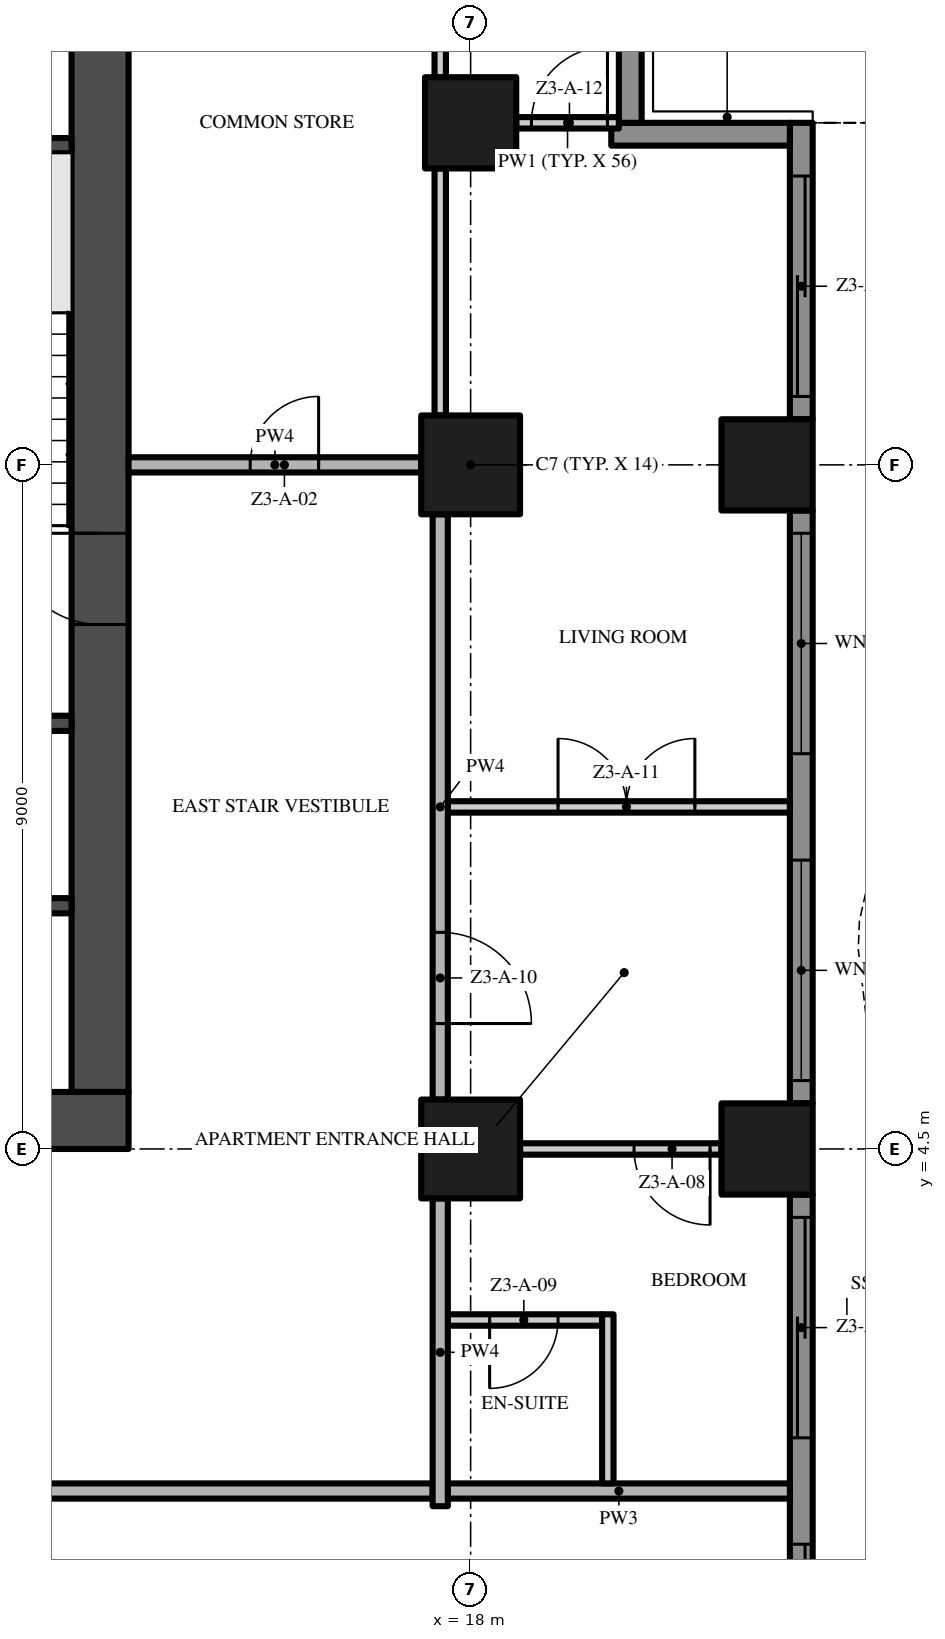
"""IFC4 building model, lengths in metres.
Left out: names, types, materials, properties, quantities, classifications, styles, units other than length and angle.
Written with IfcOpenShell. Run it as: python <this file> out.ifc"""

import sys

from ifc_helpers import new_model, si_unit, direction, frame, frame_2d, origin, origin_2d, place, context, subcontext, project, spatial, polyline, rectangle, outline, extrude, element, fill, save


model = new_model("IFC4")
c1 = context("Model", 3, precision=1e-05, world=origin(), true_north=direction((0.0, 1.0)))
c2 = subcontext(c1, "Body", "Model", "MODEL_VIEW")
j1 = project(units=[si_unit("LENGTHUNIT", "METRE"), si_unit("PLANEANGLEUNIT", "RADIAN")], contexts=[c1])
p1 = place(None, origin())
s1 = spatial("IfcSite", under=j1, at=p1, CompositionType="ELEMENT")
p2 = place(p1, origin())
s2 = spatial("IfcBuilding", under=s1, at=p2, CompositionType="ELEMENT")
p3 = place(p2, frame((0.0, 0.0, 125.0)))
s3 = spatial("IfcBuildingStorey", under=s2, at=p3, CompositionType="ELEMENT", Elevation=125.0)
p4 = place(p3, frame((-13.5, 4.875, -0.3), z_axis=(0.0, 0.0, 1.0), x_axis=(1.0, 0.0, 0.0)))
e1 = element("IfcWall", 1, at=p4, inside=s3, PredefinedType="SHEAR", context=c2, shape_type="SweptSolid", body=[
    extrude(rectangle(XDim=27.0, YDim=0.75, at=frame_2d((13.5, 0.0))), origin(), (0.0, 0.0, 1.0), 3.8),
])
p5 = place(p4, frame((12.0, 0.0, 0.3)))
e2 = element("IfcOpeningElement", 2, at=p5, cuts=e1, PredefinedType="OPENING", context=c2, shape_type="SweptSolid", body=[
    extrude(rectangle(XDim=3.0, YDim=2.4, at=frame_2d((1.5, 1.2))), frame((0.0, 0.385, 0.0), z_axis=(0.0, -1.0, 0.0), x_axis=(1.0, 0.0, 0.0)), (0.0, 0.0, 1.0), 0.77),
])
p6 = place(p4, frame((4.9, 0.0, 0.3)))
e3 = element("IfcOpeningElement", 3, at=p6, cuts=e1, PredefinedType="OPENING", context=c2, shape_type="SweptSolid", body=[
    extrude(rectangle(XDim=1.2, YDim=2.2, at=frame_2d((0.6, 1.1))), frame((0.0, 0.385, 0.0), z_axis=(0.0, -1.0, 0.0), x_axis=(1.0, 0.0, 0.0)), (0.0, 0.0, 1.0), 0.77),
])
p7 = place(p4, frame((20.75, 0.0, 0.3)))
e4 = element("IfcOpeningElement", 4, at=p7, cuts=e1, PredefinedType="OPENING", context=c2, shape_type="SweptSolid", body=[
    extrude(rectangle(XDim=1.5, YDim=2.2, at=frame_2d((0.75, 1.1))), frame((0.0, 0.385, 0.0), z_axis=(0.0, -1.0, 0.0), x_axis=(1.0, 0.0, 0.0)), (0.0, 0.0, 1.0), 0.77),
])
p8 = place(p4, frame((17.4, 0.0, 0.3)))
e5 = element("IfcOpeningElement", 5, at=p8, cuts=e1, PredefinedType="OPENING", context=c2, shape_type="SweptSolid", body=[
    extrude(rectangle(XDim=1.2, YDim=2.2, at=frame_2d((0.6, 1.1))), frame((0.0, 0.385, 0.0), z_axis=(0.0, -1.0, 0.0), x_axis=(1.0, 0.0, 0.0)), (0.0, 0.0, 1.0), 0.77),
])
p9 = place(p3, frame((13.125, 5.25, -0.3), z_axis=(0.0, 0.0, 1.0), x_axis=(0.0, 1.0, 0.0)))
e6 = element("IfcWall", 6, at=p9, inside=s3, PredefinedType="SHEAR", context=c2, shape_type="SweptSolid", body=[
    extrude(rectangle(XDim=16.5, YDim=0.75, at=frame_2d((8.25, 0.0))), origin(), (0.0, 0.0, 1.0), 3.8),
])
p10 = place(p9, frame((6.15, 0.0, 0.3)))
e7 = element("IfcOpeningElement", 7, at=p10, cuts=e6, PredefinedType="OPENING", context=c2, shape_type="SweptSolid", body=[
    extrude(rectangle(XDim=1.2, YDim=2.2, at=frame_2d((0.6, 1.1))), frame((0.0, 0.385, 0.0), z_axis=(0.0, -1.0, 0.0), x_axis=(1.0, 0.0, 0.0)), (0.0, 0.0, 1.0), 0.77),
])
for number, where, z_axis, x_axis in (
    (8, (18.0, 13.5, 0.0), (0.0, 0.0, 1.0), (1.0, 0.0, 0.0)),
    (9, (18.0, 4.5, 0.0), (0.0, 0.0, 1.0), (1.0, 0.0, 0.0)),
):
    element("IfcColumn", number, at=place(p3, frame(where, z_axis=z_axis, x_axis=x_axis)), inside=s3, PredefinedType="COLUMN", context=c2, shape_type="SweptSolid", body=[
        extrude(rectangle(XDim=1.3, YDim=1.3, at=origin_2d()), origin(), (0.0, 0.0, 1.0), 3.5),
    ])
for number, where, z_axis, x_axis in (
    (10, (21.9, 13.5, 0.0), (0.0, 0.0, 1.0), (1.0, 0.0, 0.0)),
    (11, (18.0, 18.0, 0.0), (0.0, 0.0, 1.0), (1.0, 0.0, 0.0)),
    (12, (21.9, 4.5, 0.0), (0.0, 0.0, 1.0), (1.0, 0.0, 0.0)),
):
    element("IfcColumn", number, at=place(p3, frame(where, z_axis=z_axis, x_axis=x_axis)), inside=s3, PredefinedType="COLUMN", context=c2, shape_type="SweptSolid", body=[
        extrude(rectangle(XDim=1.2, YDim=1.2, at=origin_2d()), origin(), (0.0, 0.0, 1.0), 3.5),
    ])
p11 = place(p3, frame((22.35, 3.9, 0.0), z_axis=(0.0, 0.0, 1.0), x_axis=(0.0, -1.0, 0.0)))
e13 = element("IfcWall", 13, at=p11, inside=s3, PredefinedType="SOLIDWALL", context=c2, shape_type="SweptSolid", body=[
    extrude(rectangle(XDim=7.8, YDim=0.3, at=frame_2d((3.9, 0.0))), origin(), (0.0, 0.0, 1.0), 3.5),
])
p12 = place(p11, frame((4.6, 0.0, 0.0)))
e14 = element("IfcOpeningElement", 14, at=p12, cuts=e13, PredefinedType="OPENING", context=c2, shape_type="SweptSolid", body=[
    extrude(rectangle(XDim=2.9, YDim=2.4, at=frame_2d((1.45, 1.2))), frame((0.0, 0.16, 0.0), z_axis=(0.0, -1.0, 0.0), x_axis=(1.0, 0.0, 0.0)), (0.0, 0.0, 1.0), 0.32),
])
p13 = place(p11, frame((0.3, 0.0, 0.0)))
e15 = element("IfcOpeningElement", 15, at=p13, cuts=e13, PredefinedType="OPENING", context=c2, shape_type="SweptSolid", body=[
    extrude(rectangle(XDim=2.9, YDim=2.4, at=frame_2d((1.45, 1.2))), frame((0.0, 0.16, 0.0), z_axis=(0.0, -1.0, 0.0), x_axis=(1.0, 0.0, 0.0)), (0.0, 0.0, 1.0), 0.32),
])
p14 = place(p3, frame((22.35, 12.9, 0.0), z_axis=(0.0, 0.0, 1.0), x_axis=(0.0, -1.0, 0.0)))
e16 = element("IfcWall", 16, at=p14, inside=s3, PredefinedType="SOLIDWALL", context=c2, shape_type="SweptSolid", body=[
    extrude(rectangle(XDim=7.8, YDim=0.3, at=frame_2d((3.9, 0.0))), origin(), (0.0, 0.0, 1.0), 3.5),
])
p15 = place(p14, frame((4.6, 0.0, 0.45)))
e17 = element("IfcOpeningElement", 17, at=p15, cuts=e16, PredefinedType="OPENING", context=c2, shape_type="SweptSolid", body=[
    extrude(rectangle(XDim=2.9, YDim=2.65, at=frame_2d((1.45, 1.325))), frame((0.0, 0.16, 0.0), z_axis=(0.0, -1.0, 0.0), x_axis=(1.0, 0.0, 0.0)), (0.0, 0.0, 1.0), 0.32),
])
p16 = place(p14, frame((0.3, 0.0, 0.45)))
e18 = element("IfcOpeningElement", 18, at=p16, cuts=e16, PredefinedType="OPENING", context=c2, shape_type="SweptSolid", body=[
    extrude(rectangle(XDim=2.9, YDim=2.65, at=frame_2d((1.45, 1.325))), frame((0.0, 0.16, 0.0), z_axis=(0.0, -1.0, 0.0), x_axis=(1.0, 0.0, 0.0)), (0.0, 0.0, 1.0), 0.32),
])
p17 = place(p3, frame((22.35, 18.0, 0.0), z_axis=(0.0, 0.0, 1.0), x_axis=(0.0, -1.0, 0.0)))
e19 = element("IfcWall", 19, at=p17, inside=s3, PredefinedType="SOLIDWALL", context=c2, shape_type="SweptSolid", body=[
    extrude(rectangle(XDim=3.9, YDim=0.3, at=frame_2d((1.95, 0.0))), origin(), (0.0, 0.0, 1.0), 3.5),
])
p18 = place(p17, frame((0.7, 0.0, 0.0)))
e20 = element("IfcOpeningElement", 20, at=p18, cuts=e19, PredefinedType="OPENING", context=c2, shape_type="SweptSolid", body=[
    extrude(rectangle(XDim=2.9, YDim=2.4, at=frame_2d((1.45, 1.2))), frame((0.0, 0.16, 0.0), z_axis=(0.0, -1.0, 0.0), x_axis=(1.0, 0.0, 0.0)), (0.0, 0.0, 1.0), 0.32),
])
p19 = place(p3, frame((19.85, 17.85, 0.0), z_axis=(0.0, 0.0, 1.0), x_axis=(1.0, 0.0, 0.0)))
e21 = element("IfcWall", 21, at=p19, inside=s3, PredefinedType="SOLIDWALL", context=c2, shape_type="SweptSolid", body=[
    extrude(rectangle(XDim=2.35, YDim=0.3, at=frame_2d((1.175, 0.0))), origin(), (0.0, 0.0, 1.0), 3.5),
])
p20 = place(p3, frame((20.1, 20.25, 0.0), z_axis=(0.0, 0.0, 1.0), x_axis=(0.0, -1.0, 0.0)))
e22 = element("IfcWall", 22, at=p20, inside=s3, PredefinedType="SOLIDWALL", context=c2, shape_type="SweptSolid", body=[
    extrude(rectangle(XDim=2.25, YDim=0.3, at=frame_2d((1.125, 0.0))), origin(), (0.0, 0.0, 1.0), 3.5),
])
p21 = place(p3, origin())
e23 = element("IfcWall", 23, at=p21, inside=s3, PredefinedType="USERDEFINED", context=c2, shape_type="SweptSolid", body=[
    extrude(outline(polyline([(25.149, -13.5), (24.488, -12.0), (23.755, -10.5), (23.231, -9.0), (23.1, -7.875), (23.115, -7.5), (23.451, -6.0), (24.112, -4.5), (24.845, -3.0), (25.369, -1.5), (25.5, -0.375), (25.485, 0.0), (25.149, 1.5), (24.488, 3.0), (23.755, 4.5), (23.231, 6.0), (23.1, 7.125), (23.115, 7.5), (23.451, 9.0), (24.112, 10.5), (24.845, 12.0), (25.369, 13.5), (25.5, 14.625), (25.485, 15.0), (25.149, 16.5), (24.488, 18.0), (24.259, 17.899), (24.91, 16.421), (25.236, 14.967), (25.249, 14.635), (25.124, 13.556), (24.614, 12.096), (23.885, 10.605), (23.213, 9.079), (22.866, 7.533), (22.849, 7.115), (22.986, 5.944), (23.524, 4.404), (24.261, 2.895), (24.91, 1.421), (25.236, -0.033), (25.249, -0.365), (25.124, -1.444), (24.614, -2.904), (23.885, -4.395), (23.213, -5.921), (22.866, -7.467), (22.849, -7.885), (22.986, -9.056), (23.524, -10.596), (24.261, -12.105), (24.92, -13.601), (25.149, -13.5)])), origin(), (0.0, 0.0, 1.0), 0.9),
])
for number, where, z_axis, x_axis in (
    (24, (9.65, 7.7, 0.0), (0.0, 0.0, 1.0), (1.0, 0.0, 0.0)),
    (25, (9.65, 10.1, 0.0), (0.0, 0.0, 1.0), (1.0, 0.0, 0.0)),
    (26, (9.65, 17.7, 0.0), (0.0, 0.0, 1.0), (1.0, 0.0, 0.0)),
):
    element("IfcWall", number, at=place(p3, frame(where, z_axis=z_axis, x_axis=x_axis)), inside=s3, PredefinedType="SHEAR", context=c2, shape_type="SweptSolid", body=[
        extrude(rectangle(XDim=3.1, YDim=0.2, at=frame_2d((1.55, 0.0))), origin(), (0.0, 0.0, 1.0), 3.5),
    ])
p22 = place(p3, frame((17.5, 0.0, 0.0), z_axis=(0.0, 0.0, 1.0), x_axis=(-1.0, 0.0, 0.0)))
e27 = element("IfcWall", 27, at=p22, inside=s3, PredefinedType="PARTITIONING", context=c2, shape_type="SweptSolid", body=[
    extrude(rectangle(XDim=35.0, YDim=0.2, at=frame_2d((17.5, 0.0))), origin(), (0.0, 0.0, 1.0), 3.5),
])
p23 = place(p22, frame((16.75, 0.0, 0.0)))
e28 = element("IfcOpeningElement", 28, at=p23, cuts=e27, PredefinedType="OPENING", context=c2, shape_type="SweptSolid", body=[
    extrude(rectangle(XDim=1.5, YDim=2.4, at=frame_2d((0.75, 1.2))), frame((0.0, 0.11, 0.0), z_axis=(0.0, -1.0, 0.0), x_axis=(1.0, 0.0, 0.0)), (0.0, 0.0, 1.0), 0.22),
])
p24 = place(p3, frame((17.7, 0.0, 0.0), z_axis=(0.0, 0.0, 1.0), x_axis=(1.0, 0.0, 0.0)))
e29 = element("IfcWall", 29, at=p24, inside=s3, PredefinedType="PARTITIONING", context=c2, shape_type="SweptSolid", body=[
    extrude(rectangle(XDim=4.5, YDim=0.2, at=frame_2d((2.25, 0.0))), origin(), (0.0, 0.0, 1.0), 3.5),
])
p25 = place(p3, frame((19.73, 2.25, 0.0), z_axis=(0.0, 0.0, 1.0), x_axis=(-1.0, 0.0, 0.0)))
e30 = element("IfcWall", 30, at=p25, inside=s3, PredefinedType="PARTITIONING", context=c2, shape_type="SweptSolid", body=[
    extrude(rectangle(XDim=2.03, YDim=0.15, at=frame_2d((1.015, 0.0))), origin(), (0.0, 0.0, 1.0), 3.5),
])
p26 = place(p25, frame((0.58, 0.0, 0.0)))
e31 = element("IfcOpeningElement", 31, at=p26, cuts=e30, PredefinedType="OPENING", context=c2, shape_type="SweptSolid", body=[
    extrude(rectangle(XDim=0.9, YDim=2.1, at=frame_2d((0.45, 1.05))), frame((0.0, 0.085, 0.0), z_axis=(0.0, -1.0, 0.0), x_axis=(1.0, 0.0, 0.0)), (0.0, 0.0, 1.0), 0.17),
])
p27 = place(p3, frame((21.3, 4.5, 0.0), z_axis=(0.0, 0.0, 1.0), x_axis=(-1.0, 0.0, 0.0)))
e32 = element("IfcWall", 32, at=p27, inside=s3, PredefinedType="PARTITIONING", context=c2, shape_type="SweptSolid", body=[
    extrude(rectangle(XDim=2.65, YDim=0.15, at=frame_2d((1.325, 0.0))), origin(), (0.0, 0.0, 1.0), 3.5),
])
p28 = place(p27, frame((0.15, 0.0, 0.0)))
e33 = element("IfcOpeningElement", 33, at=p28, cuts=e32, PredefinedType="OPENING", context=c2, shape_type="SweptSolid", body=[
    extrude(rectangle(XDim=1.0, YDim=2.4, at=frame_2d((0.5, 1.2))), frame((0.0, 0.085, 0.0), z_axis=(0.0, -1.0, 0.0), x_axis=(1.0, 0.0, 0.0)), (0.0, 0.0, 1.0), 0.17),
])
p29 = place(p3, frame((17.7, 9.0, 0.0), z_axis=(0.0, 0.0, 1.0), x_axis=(1.0, 0.0, 0.0)))
e34 = element("IfcWall", 34, at=p29, inside=s3, PredefinedType="PARTITIONING", context=c2, shape_type="SweptSolid", body=[
    extrude(rectangle(XDim=4.5, YDim=0.15, at=frame_2d((2.25, 0.0))), origin(), (0.0, 0.0, 1.0), 3.5),
])
p30 = place(p29, frame((1.45, 0.0, 0.0)))
e35 = element("IfcOpeningElement", 35, at=p30, cuts=e34, PredefinedType="OPENING", context=c2, shape_type="SweptSolid", body=[
    extrude(rectangle(XDim=1.8, YDim=2.4, at=frame_2d((0.9, 1.2))), frame((0.0, 0.085, 0.0), z_axis=(0.0, -1.0, 0.0), x_axis=(1.0, 0.0, 0.0)), (0.0, 0.0, 1.0), 0.17),
])
p31 = place(p3, frame((13.5, 13.5, 0.0), z_axis=(0.0, 0.0, 1.0), x_axis=(1.0, 0.0, 0.0)))
e36 = element("IfcWall", 36, at=p31, inside=s3, PredefinedType="PARTITIONING", context=c2, shape_type="SweptSolid", body=[
    extrude(rectangle(XDim=3.85, YDim=0.2, at=frame_2d((1.925, 0.0))), origin(), (0.0, 0.0, 1.0), 3.5),
])
p32 = place(p31, frame((1.6, 0.0, 0.0)))
e37 = element("IfcOpeningElement", 37, at=p32, cuts=e36, PredefinedType="OPENING", context=c2, shape_type="SweptSolid", body=[
    extrude(rectangle(XDim=0.9, YDim=2.1, at=frame_2d((0.45, 1.05))), frame((0.0, 0.11, 0.0), z_axis=(0.0, -1.0, 0.0), x_axis=(1.0, 0.0, 0.0)), (0.0, 0.0, 1.0), 0.22),
])
p33 = place(p3, frame((18.6, 18.0, 0.0), z_axis=(0.0, 0.0, 1.0), x_axis=(1.0, 0.0, 0.0)))
e38 = element("IfcWall", 38, at=p33, inside=s3, PredefinedType="PARTITIONING", context=c2, shape_type="SweptSolid", body=[
    extrude(rectangle(XDim=1.35, YDim=0.15, at=frame_2d((0.675, 0.0))), origin(), (0.0, 0.0, 1.0), 3.5),
])
p34 = place(p33, frame((0.2, 0.0, 0.0)))
e39 = element("IfcOpeningElement", 39, at=p34, cuts=e38, PredefinedType="OPENING", context=c2, shape_type="SweptSolid", body=[
    extrude(rectangle(XDim=1.0, YDim=2.4, at=frame_2d((0.5, 1.2))), frame((0.0, 0.085, 0.0), z_axis=(0.0, -1.0, 0.0), x_axis=(1.0, 0.0, 0.0)), (0.0, 0.0, 1.0), 0.17),
])
p35 = place(p3, frame((17.6, -0.2, 0.0), z_axis=(0.0, 0.0, 1.0), x_axis=(0.0, 1.0, 0.0)))
e40 = element("IfcWall", 40, at=p35, inside=s3, PredefinedType="PARTITIONING", context=c2, shape_type="SweptSolid", body=[
    extrude(rectangle(XDim=4.05, YDim=0.2, at=frame_2d((2.025, 0.0))), origin(), (0.0, 0.0, 1.0), 3.5),
])
p36 = place(p3, frame((17.6, 12.85, 0.0), z_axis=(0.0, 0.0, 1.0), x_axis=(0.0, -1.0, 0.0)))
e41 = element("IfcWall", 41, at=p36, inside=s3, PredefinedType="PARTITIONING", context=c2, shape_type="SweptSolid", body=[
    extrude(rectangle(XDim=7.7, YDim=0.2, at=frame_2d((3.85, 0.0))), origin(), (0.0, 0.0, 1.0), 3.5),
])
p37 = place(p36, frame((5.5, 0.0, 0.0)))
e42 = element("IfcOpeningElement", 42, at=p37, cuts=e41, PredefinedType="OPENING", context=c2, shape_type="SweptSolid", body=[
    extrude(rectangle(XDim=1.2, YDim=2.4, at=frame_2d((0.6, 1.2))), frame((0.0, 0.11, 0.0), z_axis=(0.0, -1.0, 0.0), x_axis=(1.0, 0.0, 0.0)), (0.0, 0.0, 1.0), 0.22),
])
p38 = place(p3, frame((17.6, 14.15, 0.0), z_axis=(0.0, 0.0, 1.0), x_axis=(0.0, 1.0, 0.0)))
e43 = element("IfcWall", 43, at=p38, inside=s3, PredefinedType="PARTITIONING", context=c2, shape_type="SweptSolid", body=[
    extrude(rectangle(XDim=3.25, YDim=0.15, at=frame_2d((1.625, 0.0))), origin(), (0.0, 0.0, 1.0), 3.5),
])
p39 = place(p3, frame((17.6, 18.6, 0.0), z_axis=(0.0, 0.0, 1.0), x_axis=(0.0, 1.0, 0.0)))
e44 = element("IfcWall", 44, at=p39, inside=s3, PredefinedType="PARTITIONING", context=c2, shape_type="SweptSolid", body=[
    extrude(rectangle(XDim=2.7, YDim=0.15, at=frame_2d((1.35, 0.0))), origin(), (0.0, 0.0, 1.0), 3.5),
])
p40 = place(p3, frame((19.805, 0.1, 0.0), z_axis=(0.0, 0.0, 1.0), x_axis=(0.0, 1.0, 0.0)))
e45 = element("IfcWall", 45, at=p40, inside=s3, PredefinedType="PARTITIONING", context=c2, shape_type="SweptSolid", body=[
    extrude(rectangle(XDim=2.225, YDim=0.15, at=frame_2d((1.113, 0.0))), origin(), (0.0, 0.0, 1.0), 3.5),
])
p41 = place(p12, origin())
e46 = element("IfcDoor", 46, at=p41, inside=s3, OperationType="SINGLE_SWING_LEFT", PredefinedType="DOOR", context=c2, shape_type="SweptSolid", body=[
    extrude(rectangle(XDim=2.9, YDim=2.4, at=frame_2d((1.45, 1.2))), frame((0.0, 0.025, 0.0), z_axis=(0.0, -1.0, 0.0), x_axis=(1.0, 0.0, 0.0)), (0.0, 0.0, 1.0), 0.05),
])
fill(e14, e46)
p42 = place(p13, origin())
e47 = element("IfcDoor", 47, at=p42, inside=s3, OperationType="SINGLE_SWING_LEFT", PredefinedType="DOOR", context=c2, shape_type="SweptSolid", body=[
    extrude(rectangle(XDim=2.9, YDim=2.4, at=frame_2d((1.45, 1.2))), frame((0.0, 0.025, 0.0), z_axis=(0.0, -1.0, 0.0), x_axis=(1.0, 0.0, 0.0)), (0.0, 0.0, 1.0), 0.05),
])
fill(e15, e47)
p43 = place(p15, origin())
e48 = element("IfcWindow", 48, at=p43, inside=s3, PartitioningType="SINGLE_PANEL", PredefinedType="WINDOW", context=c2, shape_type="SweptSolid", body=[
    extrude(rectangle(XDim=2.9, YDim=2.65, at=frame_2d((1.45, 1.325))), frame((0.0, 0.03, 0.0), z_axis=(0.0, -1.0, 0.0), x_axis=(1.0, 0.0, 0.0)), (0.0, 0.0, 1.0), 0.06),
])
fill(e17, e48)
p44 = place(p16, origin())
e49 = element("IfcWindow", 49, at=p44, inside=s3, PartitioningType="SINGLE_PANEL", PredefinedType="WINDOW", context=c2, shape_type="SweptSolid", body=[
    extrude(rectangle(XDim=2.9, YDim=2.65, at=frame_2d((1.45, 1.325))), frame((0.0, 0.03, 0.0), z_axis=(0.0, -1.0, 0.0), x_axis=(1.0, 0.0, 0.0)), (0.0, 0.0, 1.0), 0.06),
])
fill(e18, e49)
p45 = place(p18, origin())
e50 = element("IfcDoor", 50, at=p45, inside=s3, OperationType="SINGLE_SWING_LEFT", PredefinedType="DOOR", context=c2, shape_type="SweptSolid", body=[
    extrude(rectangle(XDim=2.9, YDim=2.4, at=frame_2d((1.45, 1.2))), frame((0.0, 0.025, 0.0), z_axis=(0.0, -1.0, 0.0), x_axis=(1.0, 0.0, 0.0)), (0.0, 0.0, 1.0), 0.05),
])
fill(e20, e50)
p46 = place(p10, frame((1.2, 0.0, 0.0), z_axis=(0.0, 0.0, 1.0), x_axis=(-1.0, 0.0, 0.0)))
e51 = element("IfcDoor", 51, at=p46, inside=s3, OperationType="SINGLE_SWING_LEFT", PredefinedType="DOOR", context=c2, shape_type="SweptSolid", body=[
    extrude(rectangle(XDim=1.2, YDim=2.2, at=frame_2d((0.6, 1.1))), frame((0.0, 0.025, 0.0), z_axis=(0.0, -1.0, 0.0), x_axis=(1.0, 0.0, 0.0)), (0.0, 0.0, 1.0), 0.05),
])
fill(e7, e51)
p47 = place(p32, origin())
e52 = element("IfcDoor", 52, at=p47, inside=s3, OperationType="SINGLE_SWING_RIGHT", PredefinedType="DOOR", context=c2, shape_type="SweptSolid", body=[
    extrude(rectangle(XDim=0.9, YDim=2.1, at=frame_2d((0.45, 1.05))), frame((0.0, 0.025, 0.0), z_axis=(0.0, -1.0, 0.0), x_axis=(1.0, 0.0, 0.0)), (0.0, 0.0, 1.0), 0.05),
])
fill(e37, e52)
p48 = place(p28, origin())
e53 = element("IfcDoor", 53, at=p48, inside=s3, OperationType="SINGLE_SWING_LEFT", PredefinedType="DOOR", context=c2, shape_type="SweptSolid", body=[
    extrude(rectangle(XDim=1.0, YDim=2.4, at=frame_2d((0.5, 1.2))), frame((0.0, 0.025, 0.0), z_axis=(0.0, -1.0, 0.0), x_axis=(1.0, 0.0, 0.0)), (0.0, 0.0, 1.0), 0.05),
])
fill(e33, e53)
p49 = place(p26, origin())
e54 = element("IfcDoor", 54, at=p49, inside=s3, OperationType="SINGLE_SWING_RIGHT", PredefinedType="DOOR", context=c2, shape_type="SweptSolid", body=[
    extrude(rectangle(XDim=0.9, YDim=2.1, at=frame_2d((0.45, 1.05))), frame((0.0, 0.025, 0.0), z_axis=(0.0, -1.0, 0.0), x_axis=(1.0, 0.0, 0.0)), (0.0, 0.0, 1.0), 0.05),
])
fill(e31, e54)
p50 = place(p37, origin())
e55 = element("IfcDoor", 55, at=p50, inside=s3, OperationType="SINGLE_SWING_RIGHT", PredefinedType="DOOR", context=c2, shape_type="SweptSolid", body=[
    extrude(rectangle(XDim=1.2, YDim=2.4, at=frame_2d((0.6, 1.2))), frame((0.0, 0.025, 0.0), z_axis=(0.0, -1.0, 0.0), x_axis=(1.0, 0.0, 0.0)), (0.0, 0.0, 1.0), 0.05),
])
fill(e42, e55)
p51 = place(p30, origin())
e56 = element("IfcDoor", 56, at=p51, inside=s3, OperationType="DOUBLE_DOOR_SINGLE_SWING", PredefinedType="DOOR", context=c2, shape_type="SweptSolid", body=[
    extrude(rectangle(XDim=1.8, YDim=2.4, at=frame_2d((0.9, 1.2))), frame((0.0, 0.025, 0.0), z_axis=(0.0, -1.0, 0.0), x_axis=(1.0, 0.0, 0.0)), (0.0, 0.0, 1.0), 0.05),
])
fill(e35, e56)
p52 = place(p34, origin())
e57 = element("IfcDoor", 57, at=p52, inside=s3, OperationType="SINGLE_SWING_RIGHT", PredefinedType="DOOR", context=c2, shape_type="SweptSolid", body=[
    extrude(rectangle(XDim=1.0, YDim=2.4, at=frame_2d((0.5, 1.2))), frame((0.0, 0.025, 0.0), z_axis=(0.0, -1.0, 0.0), x_axis=(1.0, 0.0, 0.0)), (0.0, 0.0, 1.0), 0.05),
])
fill(e39, e57)
save(model, sys.argv[1])
